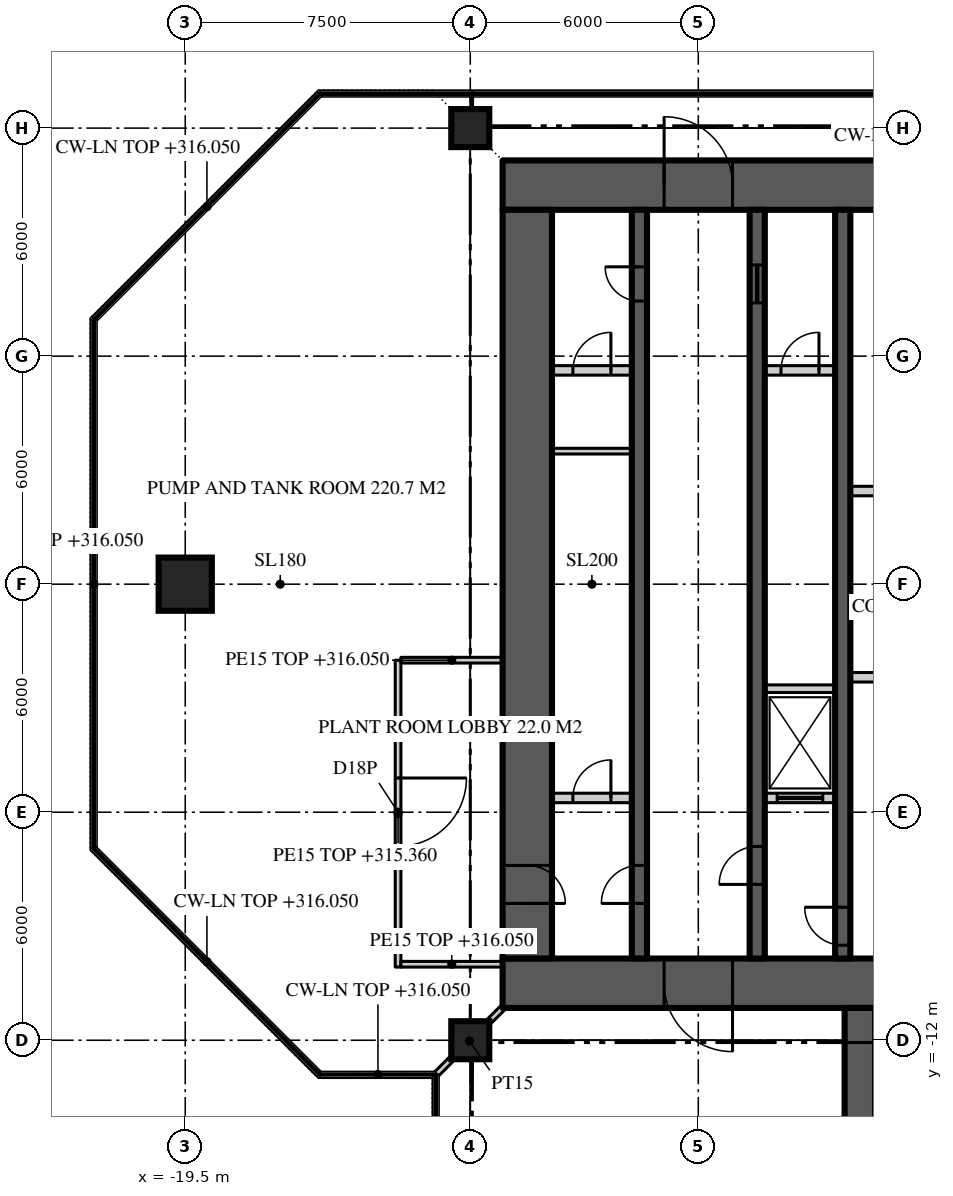
"""IFC4 building model, lengths in metres.
Left out: names, types, materials, properties, quantities, classifications, styles, units other than length and angle.
Written with IfcOpenShell. Run it as: python <this file> out.ifc"""

import sys

from ifc_helpers import new_model, si_unit, direction, frame, frame_2d, origin, origin_2d, place, context, subcontext, project, spatial, rectangle, extrude, element, fill, save


model = new_model("IFC4")
c1 = context("Model", 3, precision=1e-05, world=origin(), true_north=direction((0.0, 1.0)))
c2 = subcontext(c1, "Body", "Model", "MODEL_VIEW")
j1 = project(units=[si_unit("LENGTHUNIT", "METRE"), si_unit("PLANEANGLEUNIT", "RADIAN")], contexts=[c1])
p1 = place(None, origin())
s1 = spatial("IfcSite", under=j1, at=p1, CompositionType="ELEMENT")
p2 = place(p1, origin())
s2 = spatial("IfcBuilding", under=s1, at=p2, CompositionType="ELEMENT")
p3 = place(p2, frame((0.0, 0.0, 311.3)))
s3 = spatial("IfcBuildingStorey", under=s2, at=p3, CompositionType="ELEMENT", Elevation=311.3)
p4 = place(p3, frame((-11.15, 10.5, 0.0), z_axis=(0.0, 0.0, 1.0), x_axis=(1.0, 0.0, 0.0)))
e1 = element("IfcWall", 1, at=p4, inside=s3, PredefinedType="SHEAR", context=c2, shape_type="SweptSolid", body=[
    extrude(rectangle(XDim=22.3, YDim=1.3, at=frame_2d((11.15, 0.0))), origin(), (0.0, 0.0, 1.0), 5.0),
])
p5 = place(p4, frame((4.25, 0.0, 0.0)))
e2 = element("IfcOpeningElement", 2, at=p5, cuts=e1, PredefinedType="OPENING", context=c2, shape_type="SweptSolid", body=[
    extrude(rectangle(XDim=1.8, YDim=2.2, at=frame_2d((0.9, 1.1))), frame((0.0, 0.66, 0.0), z_axis=(0.0, -1.0, 0.0), x_axis=(1.0, 0.0, 0.0)), (0.0, 0.0, 1.0), 1.32),
])
p6 = place(p4, frame((16.25, 0.0, 0.0)))
e3 = element("IfcOpeningElement", 3, at=p6, cuts=e1, PredefinedType="OPENING", context=c2, shape_type="SweptSolid", body=[
    extrude(rectangle(XDim=1.8, YDim=2.2, at=frame_2d((0.9, 1.1))), frame((0.0, 0.66, 0.0), z_axis=(0.0, -1.0, 0.0), x_axis=(1.0, 0.0, 0.0)), (0.0, 0.0, 1.0), 1.32),
])
p7 = place(p3, frame((11.15, -10.5, 0.0), z_axis=(0.0, 0.0, 1.0), x_axis=(-1.0, 0.0, 0.0)))
e4 = element("IfcWall", 4, at=p7, inside=s3, PredefinedType="SHEAR", context=c2, shape_type="SweptSolid", body=[
    extrude(rectangle(XDim=22.3, YDim=1.3, at=frame_2d((11.15, 0.0))), origin(), (0.0, 0.0, 1.0), 5.0),
])
p8 = place(p7, frame((16.25, 0.0, 0.0)))
e5 = element("IfcOpeningElement", 5, at=p8, cuts=e4, PredefinedType="OPENING", context=c2, shape_type="SweptSolid", body=[
    extrude(rectangle(XDim=1.8, YDim=2.2, at=frame_2d((0.9, 1.1))), frame((0.0, 0.66, 0.0), z_axis=(0.0, -1.0, 0.0), x_axis=(1.0, 0.0, 0.0)), (0.0, 0.0, 1.0), 1.32),
])
p9 = place(p7, frame((4.25, 0.0, 0.0)))
e6 = element("IfcOpeningElement", 6, at=p9, cuts=e4, PredefinedType="OPENING", context=c2, shape_type="SweptSolid", body=[
    extrude(rectangle(XDim=1.8, YDim=2.2, at=frame_2d((0.9, 1.1))), frame((0.0, 0.66, 0.0), z_axis=(0.0, -1.0, 0.0), x_axis=(1.0, 0.0, 0.0)), (0.0, 0.0, 1.0), 1.32),
])
p10 = place(p3, frame((-10.5, 9.85, 0.0), z_axis=(0.0, 0.0, 1.0), x_axis=(0.0, -1.0, 0.0)))
e7 = element("IfcWall", 7, at=p10, inside=s3, PredefinedType="SHEAR", context=c2, shape_type="SweptSolid", body=[
    extrude(rectangle(XDim=19.7, YDim=1.3, at=frame_2d((9.85, 0.0))), origin(), (0.0, 0.0, 1.0), 5.0),
])
p11 = place(p10, frame((17.25, 0.0, 0.0)))
e8 = element("IfcOpeningElement", 8, at=p11, cuts=e7, PredefinedType="OPENING", context=c2, shape_type="SweptSolid", body=[
    extrude(rectangle(XDim=1.0, YDim=2.2, at=frame_2d((0.5, 1.1))), frame((0.0, 0.66, 0.0), z_axis=(0.0, -1.0, 0.0), x_axis=(1.0, 0.0, 0.0)), (0.0, 0.0, 1.0), 1.32),
])
p12 = place(p3, frame((-1.75, -11.15, 0.0), z_axis=(0.0, 0.0, 1.0), x_axis=(0.0, -1.0, 0.0)))
e9 = element("IfcWall", 9, at=p12, inside=s3, PredefinedType="SHEAR", context=c2, shape_type="SweptSolid", body=[
    extrude(rectangle(XDim=7.625, YDim=0.8, at=frame_2d((3.812, 0.0))), origin(), (0.0, 0.0, 1.0), 5.0),
])
p13 = place(p3, frame((-12.0, -12.0, 0.0), z_axis=(0.0, 0.0, 1.0), x_axis=(1.0, 0.0, 0.0)))
e10 = element("IfcColumn", 10, at=p13, inside=s3, PredefinedType="COLUMN", context=c2, shape_type="SweptSolid", body=[
    extrude(rectangle(XDim=1.0, YDim=1.0, at=origin_2d()), origin(), (0.0, 0.0, 1.0), 5.0),
])
p14 = place(p3, frame((-19.5, 0.0, 0.0), z_axis=(0.0, 0.0, 1.0), x_axis=(1.0, 0.0, 0.0)))
e11 = element("IfcColumn", 11, at=p14, inside=s3, PredefinedType="COLUMN", context=c2, shape_type="SweptSolid", body=[
    extrude(rectangle(XDim=1.4, YDim=1.4, at=origin_2d()), origin(), (0.0, 0.0, 1.0), 5.0),
])
p15 = place(p3, frame((-12.0, 12.0, 0.0), z_axis=(0.0, 0.0, 1.0), x_axis=(1.0, 0.0, 0.0)))
e12 = element("IfcColumn", 12, at=p15, inside=s3, PredefinedType="COLUMN", context=c2, shape_type="SweptSolid", body=[
    extrude(rectangle(XDim=1.0, YDim=1.0, at=origin_2d()), origin(), (0.0, 0.0, 1.0), 5.0),
])
p16 = place(p3, frame((-7.55, -9.85, 0.0), z_axis=(0.0, 0.0, 1.0), x_axis=(0.0, 1.0, 0.0)))
e13 = element("IfcWall", 13, at=p16, inside=s3, PredefinedType="SHEAR", context=c2, shape_type="SweptSolid", body=[
    extrude(rectangle(XDim=19.7, YDim=0.4, at=frame_2d((9.85, 0.0))), origin(), (0.0, 0.0, 1.0), 4.75),
])
p17 = place(p16, frame((1.45, 0.0, 0.0)))
e14 = element("IfcOpeningElement", 14, at=p17, cuts=e13, PredefinedType="OPENING", context=c2, shape_type="SweptSolid", body=[
    extrude(rectangle(XDim=1.0, YDim=2.2, at=frame_2d((0.5, 1.1))), frame((0.0, 0.21, 0.0), z_axis=(0.0, -1.0, 0.0), x_axis=(1.0, 0.0, 0.0)), (0.0, 0.0, 1.0), 0.42),
])
p18 = place(p16, frame((17.3, 0.0, 0.0)))
e15 = element("IfcOpeningElement", 15, at=p18, cuts=e13, PredefinedType="OPENING", context=c2, shape_type="SweptSolid", body=[
    extrude(rectangle(XDim=0.9, YDim=2.1, at=frame_2d((0.45, 1.05))), frame((0.0, 0.21, 0.0), z_axis=(0.0, -1.0, 0.0), x_axis=(1.0, 0.0, 0.0)), (0.0, 0.0, 1.0), 0.42),
])
p19 = place(p3, frame((-4.45, -9.85, 0.0), z_axis=(0.0, 0.0, 1.0), x_axis=(0.0, 1.0, 0.0)))
e16 = element("IfcWall", 16, at=p19, inside=s3, PredefinedType="SHEAR", context=c2, shape_type="SweptSolid", body=[
    extrude(rectangle(XDim=19.7, YDim=0.4, at=frame_2d((9.85, 0.0))), origin(), (0.0, 0.0, 1.0), 4.75),
])
p20 = place(p19, frame((1.95, 0.0, 0.0)))
e17 = element("IfcOpeningElement", 17, at=p20, cuts=e16, PredefinedType="OPENING", context=c2, shape_type="SweptSolid", body=[
    extrude(rectangle(XDim=1.0, YDim=2.2, at=frame_2d((0.5, 1.1))), frame((0.0, 0.21, 0.0), z_axis=(0.0, -1.0, 0.0), x_axis=(1.0, 0.0, 0.0)), (0.0, 0.0, 1.0), 0.42),
])
p21 = place(p19, frame((17.25, 0.0, 0.0)))
e18 = element("IfcOpeningElement", 18, at=p21, cuts=e16, PredefinedType="OPENING", context=c2, shape_type="SweptSolid", body=[
    extrude(rectangle(XDim=1.0, YDim=2.1, at=frame_2d((0.5, 1.05))), frame((0.0, 0.21, 0.0), z_axis=(0.0, -1.0, 0.0), x_axis=(1.0, 0.0, 0.0)), (0.0, 0.0, 1.0), 0.42),
])
p22 = place(p3, frame((-2.2, -9.85, 0.0), z_axis=(0.0, 0.0, 1.0), x_axis=(0.0, 1.0, 0.0)))
e19 = element("IfcWall", 19, at=p22, inside=s3, PredefinedType="SHEAR", context=c2, shape_type="SweptSolid", body=[
    extrude(rectangle(XDim=19.7, YDim=0.4, at=frame_2d((9.85, 0.0))), origin(), (0.0, 0.0, 1.0), 4.75),
])
p23 = place(p22, frame((0.35, 0.0, 0.0)))
e20 = element("IfcOpeningElement", 20, at=p23, cuts=e19, PredefinedType="OPENING", context=c2, shape_type="SweptSolid", body=[
    extrude(rectangle(XDim=1.0, YDim=2.2, at=frame_2d((0.5, 1.1))), frame((0.0, 0.21, 0.0), z_axis=(0.0, -1.0, 0.0), x_axis=(1.0, 0.0, 0.0)), (0.0, 0.0, 1.0), 0.42),
])
p24 = place(p3, frame((-9.85, 5.625, 0.0), z_axis=(0.0, 0.0, 1.0), x_axis=(1.0, 0.0, 0.0)))
e21 = element("IfcWall", 21, at=p24, inside=s3, PredefinedType="SOLIDWALL", context=c2, shape_type="SweptSolid", body=[
    extrude(rectangle(XDim=2.1, YDim=0.25, at=frame_2d((1.05, 0.0))), origin(), (0.0, 0.0, 1.0), 4.75),
])
p25 = place(p24, frame((0.55, 0.0, 0.0)))
e22 = element("IfcOpeningElement", 22, at=p25, cuts=e21, PredefinedType="OPENING", context=c2, shape_type="SweptSolid", body=[
    extrude(rectangle(XDim=1.0, YDim=2.2, at=frame_2d((0.5, 1.1))), frame((0.0, 0.135, 0.0), z_axis=(0.0, -1.0, 0.0), x_axis=(1.0, 0.0, 0.0)), (0.0, 0.0, 1.0), 0.27),
])
p26 = place(p3, frame((-4.25, 5.625, 0.0), z_axis=(0.0, 0.0, 1.0), x_axis=(1.0, 0.0, 0.0)))
e23 = element("IfcWall", 23, at=p26, inside=s3, PredefinedType="SOLIDWALL", context=c2, shape_type="SweptSolid", body=[
    extrude(rectangle(XDim=1.85, YDim=0.25, at=frame_2d((0.925, 0.0))), origin(), (0.0, 0.0, 1.0), 4.75),
])
p27 = place(p26, frame((0.425, 0.0, 0.0)))
e24 = element("IfcOpeningElement", 24, at=p27, cuts=e23, PredefinedType="OPENING", context=c2, shape_type="SweptSolid", body=[
    extrude(rectangle(XDim=1.0, YDim=2.2, at=frame_2d((0.5, 1.1))), frame((0.0, 0.135, 0.0), z_axis=(0.0, -1.0, 0.0), x_axis=(1.0, 0.0, 0.0)), (0.0, 0.0, 1.0), 0.27),
])
p28 = place(p3, frame((-9.85, -5.625, 0.0), z_axis=(0.0, 0.0, 1.0), x_axis=(1.0, 0.0, 0.0)))
e25 = element("IfcWall", 25, at=p28, inside=s3, PredefinedType="SOLIDWALL", context=c2, shape_type="SweptSolid", body=[
    extrude(rectangle(XDim=2.1, YDim=0.25, at=frame_2d((1.05, 0.0))), origin(), (0.0, 0.0, 1.0), 4.75),
])
p29 = place(p28, frame((0.55, 0.0, 0.0)))
e26 = element("IfcOpeningElement", 26, at=p29, cuts=e25, PredefinedType="OPENING", context=c2, shape_type="SweptSolid", body=[
    extrude(rectangle(XDim=1.0, YDim=2.2, at=frame_2d((0.5, 1.1))), frame((0.0, 0.135, 0.0), z_axis=(0.0, -1.0, 0.0), x_axis=(1.0, 0.0, 0.0)), (0.0, 0.0, 1.0), 0.27),
])
p30 = place(p3, frame((-4.25, -5.625, 0.0), z_axis=(0.0, 0.0, 1.0), x_axis=(1.0, 0.0, 0.0)))
e27 = element("IfcWall", 27, at=p30, inside=s3, PredefinedType="SOLIDWALL", context=c2, shape_type="SweptSolid", body=[
    extrude(rectangle(XDim=1.85, YDim=0.25, at=frame_2d((0.925, 0.0))), origin(), (0.0, 0.0, 1.0), 4.75),
])
p31 = place(p30, frame((0.325, 0.0, 0.0)))
e28 = element("IfcOpeningElement", 28, at=p31, cuts=e27, PredefinedType="OPENING", context=c2, shape_type="SweptSolid", body=[
    extrude(rectangle(XDim=1.2, YDim=2.2, at=frame_2d((0.6, 1.1))), frame((0.0, 0.135, 0.0), z_axis=(0.0, -1.0, 0.0), x_axis=(1.0, 0.0, 0.0)), (0.0, 0.0, 1.0), 0.27),
])
for number, where, z_axis, x_axis in (
    (29, (-2.0, -2.45, 0.0), (0.0, 0.0, 1.0), (1.0, 0.0, 0.0)),
    (30, (-2.0, 2.45, 0.0), (0.0, 0.0, 1.0), (1.0, 0.0, 0.0)),
):
    element("IfcWall", number, at=place(p3, frame(where, z_axis=z_axis, x_axis=x_axis)), inside=s3, PredefinedType="SOLIDWALL", context=c2, shape_type="SweptSolid", body=[
        extrude(rectangle(XDim=4.0, YDim=0.25, at=frame_2d((2.0, 0.0))), origin(), (0.0, 0.0, 1.0), 4.75),
    ])
p32 = place(p3, frame((-4.25, -2.75, 0.0), z_axis=(0.0, 0.0, 1.0), x_axis=(1.0, 0.0, 0.0)))
e31 = element("IfcWall", 31, at=p32, inside=s3, PredefinedType="SOLIDWALL", context=c2, shape_type="SweptSolid", body=[
    extrude(rectangle(XDim=1.85, YDim=0.2, at=frame_2d((0.925, 0.0))), origin(), (0.0, 0.0, 1.0), 4.75),
])
p33 = place(p3, frame((-13.9, -2.0, 0.0), z_axis=(0.0, 0.0, 1.0), x_axis=(0.0, -1.0, 0.0)))
e32 = element("IfcWall", 32, at=p33, inside=s3, PredefinedType="SOLIDWALL", context=c2, shape_type="SweptSolid", body=[
    extrude(rectangle(XDim=8.075, YDim=0.15, at=frame_2d((4.038, 0.0))), origin(), (0.0, 0.0, 1.0), 4.06),
])
p34 = place(p33, frame((3.1, 0.0, 0.0)))
e33 = element("IfcOpeningElement", 33, at=p34, cuts=e32, PredefinedType="OPENING", context=c2, shape_type="SweptSolid", body=[
    extrude(rectangle(XDim=1.8, YDim=2.4, at=frame_2d((0.9, 1.2))), frame((0.0, 0.085, 0.0), z_axis=(0.0, -1.0, 0.0), x_axis=(1.0, 0.0, 0.0)), (0.0, 0.0, 1.0), 0.17),
])
for number, where, z_axis, x_axis in (
    (34, (-11.15, -10.0, 0.0), (0.0, 0.0, 1.0), (-1.0, 0.0, 0.0)),
    (35, (-11.15, -2.0, 0.0), (0.0, 0.0, 1.0), (-1.0, 0.0, 0.0)),
):
    element("IfcWall", number, at=place(p3, frame(where, z_axis=z_axis, x_axis=x_axis)), inside=s3, PredefinedType="SOLIDWALL", context=c2, shape_type="SweptSolid", body=[
        extrude(rectangle(XDim=2.675, YDim=0.15, at=frame_2d((1.337, 0.0))), origin(), (0.0, 0.0, 1.0), 4.75),
    ])
p35 = place(p3, frame((-11.15, -11.15, 0.0), z_axis=(0.0, 0.0, 1.0), x_axis=(-0.707106781187, -0.707106781187, 0.0)))
e36 = element("IfcWall", 36, at=p35, inside=s3, PredefinedType="PARTITIONING", context=c2, shape_type="SweptSolid", body=[
    extrude(rectangle(XDim=2.461, YDim=0.15, at=frame_2d((1.23, 0.0))), origin(), (0.0, 0.0, 1.0), 4.75),
])
p36 = place(p3, frame((-9.85, 3.5, 0.0), z_axis=(0.0, 0.0, 1.0), x_axis=(1.0, 0.0, 0.0)))
e37 = element("IfcWall", 37, at=p36, inside=s3, PredefinedType="SOLIDWALL", context=c2, shape_type="SweptSolid", body=[
    extrude(rectangle(XDim=2.1, YDim=0.15, at=frame_2d((1.05, 0.0))), origin(), (0.0, 0.0, 1.0), 4.75),
])
p37 = place(p5, origin())
e38 = element("IfcDoor", 38, at=p37, inside=s3, OperationType="DOUBLE_DOOR_DOUBLE_SWING", PredefinedType="DOOR", context=c2, shape_type="SweptSolid", body=[
    extrude(rectangle(XDim=1.8, YDim=2.2, at=frame_2d((0.9, 1.1))), frame((0.0, 0.025, 0.0), z_axis=(0.0, -1.0, 0.0), x_axis=(1.0, 0.0, 0.0)), (0.0, 0.0, 1.0), 0.05),
])
fill(e2, e38)
p38 = place(p8, origin())
e39 = element("IfcDoor", 39, at=p38, inside=s3, OperationType="DOUBLE_DOOR_DOUBLE_SWING", PredefinedType="DOOR", context=c2, shape_type="SweptSolid", body=[
    extrude(rectangle(XDim=1.8, YDim=2.2, at=frame_2d((0.9, 1.1))), frame((0.0, 0.025, 0.0), z_axis=(0.0, -1.0, 0.0), x_axis=(1.0, 0.0, 0.0)), (0.0, 0.0, 1.0), 0.05),
])
fill(e5, e39)
p39 = place(p17, origin())
e40 = element("IfcDoor", 40, at=p39, inside=s3, OperationType="SINGLE_SWING_LEFT", PredefinedType="DOOR", context=c2, shape_type="SweptSolid", body=[
    extrude(rectangle(XDim=1.0, YDim=2.2, at=frame_2d((0.5, 1.1))), frame((0.0, 0.025, 0.0), z_axis=(0.0, -1.0, 0.0), x_axis=(1.0, 0.0, 0.0)), (0.0, 0.0, 1.0), 0.05),
])
fill(e14, e40)
p40 = place(p11, origin())
e41 = element("IfcDoor", 41, at=p40, inside=s3, OperationType="SINGLE_SWING_RIGHT", PredefinedType="DOOR", context=c2, shape_type="SweptSolid", body=[
    extrude(rectangle(XDim=1.0, YDim=2.2, at=frame_2d((0.5, 1.1))), frame((0.0, 0.025, 0.0), z_axis=(0.0, -1.0, 0.0), x_axis=(1.0, 0.0, 0.0)), (0.0, 0.0, 1.0), 0.05),
])
fill(e8, e41)
p41 = place(p20, origin())
e42 = element("IfcDoor", 42, at=p41, inside=s3, OperationType="SINGLE_SWING_LEFT", PredefinedType="DOOR", context=c2, shape_type="SweptSolid", body=[
    extrude(rectangle(XDim=1.0, YDim=2.2, at=frame_2d((0.5, 1.1))), frame((0.0, 0.025, 0.0), z_axis=(0.0, -1.0, 0.0), x_axis=(1.0, 0.0, 0.0)), (0.0, 0.0, 1.0), 0.05),
])
fill(e17, e42)
p42 = place(p23, origin())
e43 = element("IfcDoor", 43, at=p42, inside=s3, OperationType="SINGLE_SWING_RIGHT", PredefinedType="DOOR", context=c2, shape_type="SweptSolid", body=[
    extrude(rectangle(XDim=1.0, YDim=2.2, at=frame_2d((0.5, 1.1))), frame((0.0, 0.025, 0.0), z_axis=(0.0, -1.0, 0.0), x_axis=(1.0, 0.0, 0.0)), (0.0, 0.0, 1.0), 0.05),
])
fill(e20, e43)
p43 = place(p18, origin())
e44 = element("IfcDoor", 44, at=p43, inside=s3, OperationType="SINGLE_SWING_RIGHT", PredefinedType="DOOR", context=c2, shape_type="SweptSolid", body=[
    extrude(rectangle(XDim=0.9, YDim=2.1, at=frame_2d((0.45, 1.05))), frame((0.0, 0.025, 0.0), z_axis=(0.0, -1.0, 0.0), x_axis=(1.0, 0.0, 0.0)), (0.0, 0.0, 1.0), 0.05),
])
fill(e15, e44)
p44 = place(p21, origin())
e45 = element("IfcDoor", 45, at=p44, inside=s3, OperationType="SLIDING_TO_LEFT", PredefinedType="DOOR", context=c2, shape_type="SweptSolid", body=[
    extrude(rectangle(XDim=1.0, YDim=2.1, at=frame_2d((0.5, 1.05))), frame((0.0, 0.025, 0.0), z_axis=(0.0, -1.0, 0.0), x_axis=(1.0, 0.0, 0.0)), (0.0, 0.0, 1.0), 0.05),
])
fill(e18, e45)
p45 = place(p31, origin())
e46 = element("IfcDoor", 46, at=p45, inside=s3, OperationType="SLIDING_TO_LEFT", PredefinedType="DOOR", context=c2, shape_type="SweptSolid", body=[
    extrude(rectangle(XDim=1.2, YDim=2.2, at=frame_2d((0.6, 1.1))), frame((0.0, 0.025, 0.0), z_axis=(0.0, -1.0, 0.0), x_axis=(1.0, 0.0, 0.0)), (0.0, 0.0, 1.0), 0.05),
])
fill(e28, e46)
p46 = place(p34, origin())
e47 = element("IfcDoor", 47, at=p46, inside=s3, OperationType="DOUBLE_DOOR_DOUBLE_SWING", PredefinedType="DOOR", context=c2, shape_type="SweptSolid", body=[
    extrude(rectangle(XDim=1.8, YDim=2.4, at=frame_2d((0.9, 1.2))), frame((0.0, 0.025, 0.0), z_axis=(0.0, -1.0, 0.0), x_axis=(1.0, 0.0, 0.0)), (0.0, 0.0, 1.0), 0.05),
])
fill(e33, e47)
p47 = place(p25, origin())
e48 = element("IfcDoor", 48, at=p47, inside=s3, OperationType="SINGLE_SWING_RIGHT", PredefinedType="DOOR", context=c2, shape_type="SweptSolid", body=[
    extrude(rectangle(XDim=1.0, YDim=2.2, at=frame_2d((0.5, 1.1))), frame((0.0, 0.025, 0.0), z_axis=(0.0, -1.0, 0.0), x_axis=(1.0, 0.0, 0.0)), (0.0, 0.0, 1.0), 0.05),
])
fill(e22, e48)
p48 = place(p29, origin())
e49 = element("IfcDoor", 49, at=p48, inside=s3, OperationType="SINGLE_SWING_RIGHT", PredefinedType="DOOR", context=c2, shape_type="SweptSolid", body=[
    extrude(rectangle(XDim=1.0, YDim=2.2, at=frame_2d((0.5, 1.1))), frame((0.0, 0.025, 0.0), z_axis=(0.0, -1.0, 0.0), x_axis=(1.0, 0.0, 0.0)), (0.0, 0.0, 1.0), 0.05),
])
fill(e26, e49)
p49 = place(p27, origin())
e50 = element("IfcDoor", 50, at=p49, inside=s3, OperationType="SINGLE_SWING_RIGHT", PredefinedType="DOOR", context=c2, shape_type="SweptSolid", body=[
    extrude(rectangle(XDim=1.0, YDim=2.2, at=frame_2d((0.5, 1.1))), frame((0.0, 0.025, 0.0), z_axis=(0.0, -1.0, 0.0), x_axis=(1.0, 0.0, 0.0)), (0.0, 0.0, 1.0), 0.05),
])
fill(e24, e50)
save(model, sys.argv[1])
